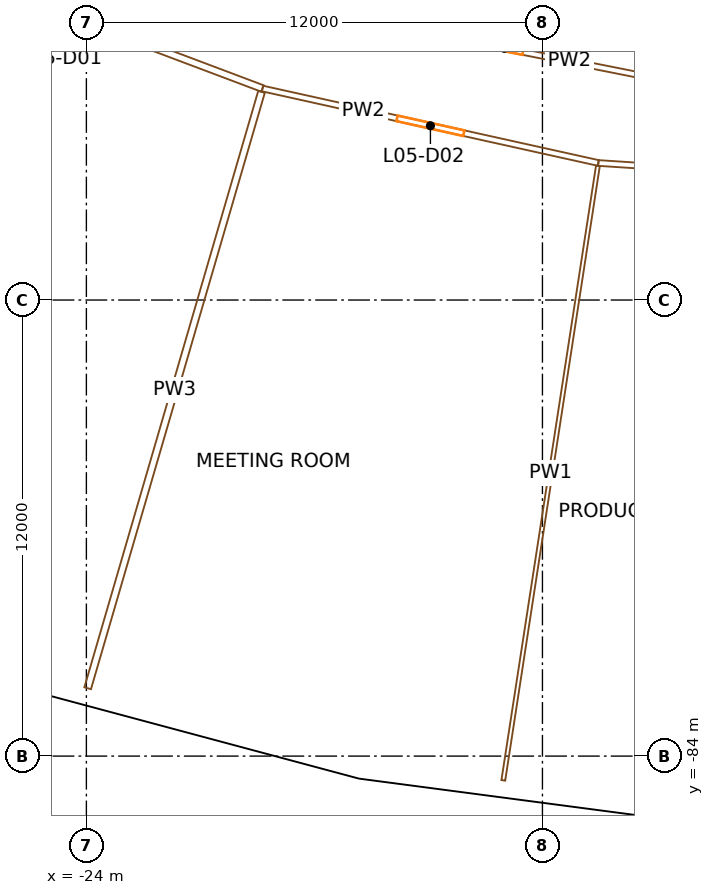
"""IFC4 building model, lengths in metres.
Left out: names, types, materials, properties, quantities, classifications, styles, units other than length and angle.
Written with IfcOpenShell. Run it as: python <this file> out.ifc"""

import sys

from ifc_helpers import new_model, si_unit, direction, frame, frame_2d, origin, origin_2d, place, context, subcontext, project, spatial, rectangle, extrude, element, fill, save


model = new_model("IFC4")
c1 = context("Model", 3, precision=1e-05, world=origin(), true_north=direction((0.0, 1.0)))
c2 = subcontext(c1, "Body", "Model", "MODEL_VIEW")
j1 = project(units=[si_unit("LENGTHUNIT", "METRE"), si_unit("PLANEANGLEUNIT", "RADIAN")], contexts=[c1])
p1 = place(None, origin())
s1 = spatial("IfcSite", under=j1, at=p1, CompositionType="ELEMENT")
p2 = place(p1, origin())
s2 = spatial("IfcBuilding", under=s1, at=p2, CompositionType="ELEMENT")
p3 = place(p2, frame((0.0, 0.0, 36.0)))
s3 = spatial("IfcBuildingStorey", under=s2, at=p3, CompositionType="ELEMENT", Elevation=36.0)
for number, where, z_axis, x_axis in (
    (1, (-24.992, -73.624, 0.0), (0.0, 0.0, 1.0), (0.947, -0.321, 0.0)),
    (2, (-15.168, -76.256, 0.0), (0.0, 0.0, 1.0), (0.981, -0.195, 0.0)),
):
    element("IfcColumn", number, at=place(p3, frame(where, z_axis=z_axis, x_axis=x_axis)), inside=s3, PredefinedType="COLUMN", context=c2, shape_type="SweptSolid", body=[
        extrude(rectangle(XDim=1.4, YDim=1.8, at=origin_2d()), origin(), (0.0, 0.0, 1.0), 4.5),
    ])
p4 = place(p3, frame((-16.631, -83.612, 0.0), z_axis=(0.0, 0.0, 1.0), x_axis=(0.980785280403, -0.195090322016, 0.0)))
e3 = element("IfcColumn", 3, at=p4, inside=s3, PredefinedType="COLUMN", context=c2, shape_type="SweptSolid", body=[
    extrude(rectangle(XDim=1.1, YDim=1.3, at=origin_2d()), origin(), (0.0, 0.0, 1.0), 4.5),
])
p5 = place(p3, frame((-27.681, -81.451, 0.0), z_axis=(0.0, 0.0, 1.0), x_axis=(0.965923678926, -0.258827059038, 0.0)))
e4 = element("IfcWall", 4, at=p5, inside=s3, PredefinedType="SOLIDWALL", context=c2, shape_type="SweptSolid", body=[
    extrude(rectangle(XDim=11.312, YDim=0.45, at=frame_2d((5.656, 0.0))), origin(), (0.0, 0.0, 1.0), 3.2),
])
p6 = place(p5, frame((4.006, 0.0, 0.9)))
e5 = element("IfcOpeningElement", 5, at=p6, cuts=e4, PredefinedType="OPENING", context=c2, shape_type="SweptSolid", body=[
    extrude(rectangle(XDim=1.2, YDim=2.15, at=frame_2d((0.6, 1.075))), frame((0.0, 0.235, 0.0), z_axis=(0.0, -1.0, 0.0), x_axis=(1.0, 0.0, 0.0)), (0.0, 0.0, 1.0), 0.47),
])
p7 = place(p5, frame((6.106, 0.0, 0.9)))
e6 = element("IfcOpeningElement", 6, at=p7, cuts=e4, PredefinedType="OPENING", context=c2, shape_type="SweptSolid", body=[
    extrude(rectangle(XDim=1.2, YDim=2.15, at=frame_2d((0.6, 1.075))), frame((0.0, 0.235, 0.0), z_axis=(0.0, -1.0, 0.0), x_axis=(1.0, 0.0, 0.0)), (0.0, 0.0, 1.0), 0.47),
])
p8 = place(p3, frame((-16.724, -84.379, 0.0), z_axis=(0.0, 0.0, 1.0), x_axis=(0.991447502826, -0.130506126829, 0.0)))
e7 = element("IfcWall", 7, at=p8, inside=s3, PredefinedType="SOLIDWALL", context=c2, shape_type="SweptSolid", body=[
    extrude(rectangle(XDim=11.135, YDim=0.45, at=frame_2d((5.567, 0.0))), origin(), (0.0, 0.0, 1.0), 3.2),
])
p9 = place(p8, frame((3.917, 0.0, 0.9)))
e8 = element("IfcOpeningElement", 8, at=p9, cuts=e7, PredefinedType="OPENING", context=c2, shape_type="SweptSolid", body=[
    extrude(rectangle(XDim=1.2, YDim=2.15, at=frame_2d((0.6, 1.075))), frame((0.0, 0.235, 0.0), z_axis=(0.0, -1.0, 0.0), x_axis=(1.0, 0.0, 0.0)), (0.0, 0.0, 1.0), 0.47),
])
p10 = place(p8, frame((6.017, 0.0, 0.9)))
e9 = element("IfcOpeningElement", 9, at=p10, cuts=e7, PredefinedType="OPENING", context=c2, shape_type="SweptSolid", body=[
    extrude(rectangle(XDim=1.2, YDim=2.15, at=frame_2d((0.6, 1.075))), frame((0.0, 0.235, 0.0), z_axis=(0.0, -1.0, 0.0), x_axis=(1.0, 0.0, 0.0)), (0.0, 0.0, 1.0), 0.47),
])
p11 = place(p3, frame((-19.366, -66.435, 0.0), z_axis=(0.0, 0.0, 1.0), x_axis=(-0.935901890315, 0.352260772305, 0.0)))
e10 = element("IfcWall", 10, at=p11, inside=s3, PredefinedType="PARTITIONING", context=c2, shape_type="SweptSolid", body=[
    extrude(rectangle(XDim=10.466, YDim=0.18, at=frame_2d((5.233, 0.0))), origin(), (0.0, 0.0, 1.0), 3.1),
])
p12 = place(p11, frame((4.333, 0.0, 0.0)))
e11 = element("IfcOpeningElement", 11, at=p12, cuts=e10, PredefinedType="OPENING", context=c2, shape_type="SweptSolid", body=[
    extrude(rectangle(XDim=1.8, YDim=2.4, at=frame_2d((0.9, 1.2))), frame((0.0, 0.1, 0.0), z_axis=(0.0, -1.0, 0.0), x_axis=(1.0, 0.0, 0.0)), (0.0, 0.0, 1.0), 0.2),
])
p13 = place(p3, frame((-23.966, -82.214, 0.0), z_axis=(0.0, 0.0, 1.0), x_axis=(0.279852024748, 0.960043147074, 0.0)))
e12 = element("IfcWall", 12, at=p13, inside=s3, PredefinedType="PARTITIONING", context=c2, shape_type="SweptSolid", body=[
    extrude(rectangle(XDim=16.346, YDim=0.18, at=frame_2d((8.173, 0.0))), origin(), (0.0, 0.0, 1.0), 3.1),
])
p14 = place(p3, frame((-10.529, -68.394, 0.0), z_axis=(0.0, 0.0, 1.0), x_axis=(-0.976288493125, 0.216473504595, 0.0)))
e13 = element("IfcWall", 13, at=p14, inside=s3, PredefinedType="PARTITIONING", context=c2, shape_type="SweptSolid", body=[
    extrude(rectangle(XDim=9.052, YDim=0.15, at=frame_2d((4.526, 0.0))), origin(), (0.0, 0.0, 1.0), 3.1),
])
p15 = place(p14, frame((3.626, 0.0, 0.0)))
e14 = element("IfcOpeningElement", 14, at=p15, cuts=e13, PredefinedType="OPENING", context=c2, shape_type="SweptSolid", body=[
    extrude(rectangle(XDim=1.8, YDim=2.1, at=frame_2d((0.9, 1.05))), frame((0.0, 0.085, 0.0), z_axis=(0.0, -1.0, 0.0), x_axis=(1.0, 0.0, 0.0)), (0.0, 0.0, 1.0), 0.17),
])
p16 = place(p3, frame((-17.289, -64.524, 0.0), z_axis=(0.0, 0.0, 1.0), x_axis=(0.980786466832, -0.195084357342, 0.0)))
e15 = element("IfcWall", 15, at=p16, inside=s3, PredefinedType="PARTITIONING", context=c2, shape_type="SweptSolid", body=[
    extrude(rectangle(XDim=8.738, YDim=0.15, at=frame_2d((4.369, 0.0))), origin(), (0.0, 0.0, 1.0), 3.1),
])
p17 = place(p16, frame((3.869, 0.0, 0.0)))
e16 = element("IfcOpeningElement", 16, at=p17, cuts=e15, PredefinedType="OPENING", context=c2, shape_type="SweptSolid", body=[
    extrude(rectangle(XDim=1.0, YDim=2.1, at=frame_2d((0.5, 1.05))), frame((0.0, 0.085, 0.0), z_axis=(0.0, -1.0, 0.0), x_axis=(1.0, 0.0, 0.0)), (0.0, 0.0, 1.0), 0.17),
])
p18 = place(p3, frame((-13.03, -84.639, 0.0), z_axis=(0.0, 0.0, 1.0), x_axis=(0.15214688942, 0.988357892689, 0.0)))
e17 = element("IfcWall", 17, at=p18, inside=s3, PredefinedType="PARTITIONING", context=c2, shape_type="SweptSolid", body=[
    extrude(rectangle(XDim=16.361, YDim=0.1, at=frame_2d((8.18, 0.0))), origin(), (0.0, 0.0, 1.0), 3.1),
])
p19 = place(p3, frame((1.511, -69.184, 0.0), z_axis=(0.0, 0.0, 1.0), x_axis=(-0.997858140049, 0.065415077291, 0.0)))
e18 = element("IfcWall", 18, at=p19, inside=s3, PredefinedType="PARTITIONING", context=c2, shape_type="SweptSolid", body=[
    extrude(rectangle(XDim=12.066, YDim=0.15, at=frame_2d((6.033, 0.0))), origin(), (0.0, 0.0, 1.0), 3.1),
])
p20 = place(p19, frame((5.133, 0.0, 0.0)))
e19 = element("IfcOpeningElement", 19, at=p20, cuts=e18, PredefinedType="OPENING", context=c2, shape_type="SweptSolid", body=[
    extrude(rectangle(XDim=1.8, YDim=2.1, at=frame_2d((0.9, 1.05))), frame((0.0, 0.085, 0.0), z_axis=(0.0, -1.0, 0.0), x_axis=(1.0, 0.0, 0.0)), (0.0, 0.0, 1.0), 0.17),
])
p21 = place(p6, origin())
e20 = element("IfcWindow", 20, at=p21, inside=s3, PartitioningType="SINGLE_PANEL", PredefinedType="WINDOW", context=c2, shape_type="SweptSolid", body=[
    extrude(rectangle(XDim=1.2, YDim=2.15, at=frame_2d((0.6, 1.075))), frame((0.0, 0.03, 0.0), z_axis=(0.0, -1.0, 0.0), x_axis=(1.0, 0.0, 0.0)), (0.0, 0.0, 1.0), 0.06),
])
fill(e5, e20)
p22 = place(p7, origin())
e21 = element("IfcWindow", 21, at=p22, inside=s3, PartitioningType="SINGLE_PANEL", PredefinedType="WINDOW", context=c2, shape_type="SweptSolid", body=[
    extrude(rectangle(XDim=1.2, YDim=2.15, at=frame_2d((0.6, 1.075))), frame((0.0, 0.03, 0.0), z_axis=(0.0, -1.0, 0.0), x_axis=(1.0, 0.0, 0.0)), (0.0, 0.0, 1.0), 0.06),
])
fill(e6, e21)
p23 = place(p9, origin())
e22 = element("IfcWindow", 22, at=p23, inside=s3, PartitioningType="SINGLE_PANEL", PredefinedType="WINDOW", context=c2, shape_type="SweptSolid", body=[
    extrude(rectangle(XDim=1.2, YDim=2.15, at=frame_2d((0.6, 1.075))), frame((0.0, 0.03, 0.0), z_axis=(0.0, -1.0, 0.0), x_axis=(1.0, 0.0, 0.0)), (0.0, 0.0, 1.0), 0.06),
])
fill(e8, e22)
p24 = place(p10, origin())
e23 = element("IfcWindow", 23, at=p24, inside=s3, PartitioningType="SINGLE_PANEL", PredefinedType="WINDOW", context=c2, shape_type="SweptSolid", body=[
    extrude(rectangle(XDim=1.2, YDim=2.15, at=frame_2d((0.6, 1.075))), frame((0.0, 0.03, 0.0), z_axis=(0.0, -1.0, 0.0), x_axis=(1.0, 0.0, 0.0)), (0.0, 0.0, 1.0), 0.06),
])
fill(e9, e23)
p25 = place(p15, origin())
e24 = element("IfcDoor", 24, at=p25, inside=s3, OperationType="DOUBLE_DOOR_SINGLE_SWING", PredefinedType="DOOR", context=c2, shape_type="SweptSolid", body=[
    extrude(rectangle(XDim=1.8, YDim=2.1, at=frame_2d((0.9, 1.05))), frame((0.0, 0.025, 0.0), z_axis=(0.0, -1.0, 0.0), x_axis=(1.0, 0.0, 0.0)), (0.0, 0.0, 1.0), 0.05),
])
fill(e14, e24)
p26 = place(p17, origin())
e25 = element("IfcDoor", 25, at=p26, inside=s3, OperationType="SINGLE_SWING_RIGHT", PredefinedType="DOOR", context=c2, shape_type="SweptSolid", body=[
    extrude(rectangle(XDim=1.0, YDim=2.1, at=frame_2d((0.5, 1.05))), frame((0.0, 0.025, 0.0), z_axis=(0.0, -1.0, 0.0), x_axis=(1.0, 0.0, 0.0)), (0.0, 0.0, 1.0), 0.05),
])
fill(e16, e25)
save(model, sys.argv[1])
